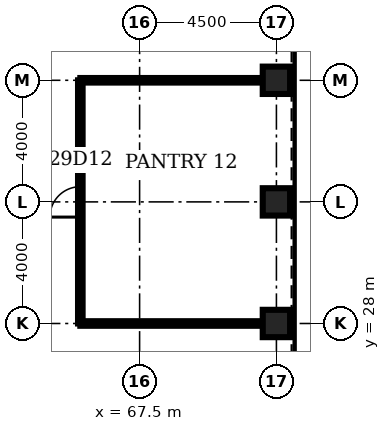
"""IFC4 building model, lengths in metres.
Left out: names, types, materials, properties, quantities, classifications, styles, units other than length and angle.
Written with IfcOpenShell. Run it as: python <this file> out.ifc"""

import sys

from ifc_helpers import new_model, si_unit, direction, frame, frame_2d, origin, origin_2d, place, context, subcontext, project, spatial, rectangle, hollow_rectangle, extrude, element, fill, save


model = new_model("IFC4")
c1 = context("Model", 3, precision=1e-05, world=origin(), true_north=direction((0.0, 1.0)))
c2 = subcontext(c1, "Body", "Model", "MODEL_VIEW")
j1 = project(units=[si_unit("LENGTHUNIT", "METRE"), si_unit("PLANEANGLEUNIT", "RADIAN")], contexts=[c1])
p1 = place(None, origin())
s1 = spatial("IfcSite", under=j1, at=p1, CompositionType="ELEMENT")
p2 = place(p1, origin())
s2 = spatial("IfcBuilding", under=s1, at=p2, CompositionType="ELEMENT")
p3 = place(p2, frame((0.0, 0.0, 134.1)))
s3 = spatial("IfcBuildingStorey", under=s2, at=p3, CompositionType="ELEMENT", Elevation=134.1)
for number, where, z_axis, x_axis in (
    (1, (72.0, 28.0, 0.0), (0.0, 0.0, 1.0), (1.0, 0.0, 0.0)),
    (2, (72.0, 32.0, 0.0), (0.0, 0.0, 1.0), (1.0, 0.0, 0.0)),
    (3, (72.0, 36.0, 0.0), (0.0, 0.0, 1.0), (1.0, 0.0, 0.0)),
):
    element("IfcColumn", number, at=place(p3, frame(where, z_axis=z_axis, x_axis=x_axis)), inside=s3, PredefinedType="COLUMN", context=c2, shape_type="SweptSolid", body=[
        extrude(hollow_rectangle(XDim=0.9, YDim=0.9, WallThickness=0.1, at=origin_2d()), origin(), (0.0, 0.0, 1.0), 4.2),
    ])
for number, where, z_axis, x_axis in (
    (4, (65.55, 28.0, 0.0), (0.0, 0.0, 1.0), (1.0, 0.0, 0.0)),
    (5, (65.55, 36.0, 0.0), (0.0, 0.0, 1.0), (1.0, 0.0, 0.0)),
):
    element("IfcWall", number, at=place(p3, frame(where, z_axis=z_axis, x_axis=x_axis)), inside=s3, PredefinedType="PARTITIONING", context=c2, shape_type="SweptSolid", body=[
        extrude(rectangle(XDim=6.0, YDim=0.15, at=frame_2d((3.0, 0.0))), origin(), (0.0, 0.0, 1.0), 3.0),
    ])
p4 = place(p3, frame((65.55, 28.0, 0.0), z_axis=(0.0, 0.0, 1.0), x_axis=(0.0, 1.0, 0.0)))
e6 = element("IfcWall", 6, at=p4, inside=s3, PredefinedType="PARTITIONING", context=c2, shape_type="SweptSolid", body=[
    extrude(rectangle(XDim=8.0, YDim=0.15, at=frame_2d((4.0, 0.0))), origin(), (0.0, 0.0, 1.0), 3.0),
])
p5 = place(p4, frame((3.5, 0.0, 0.0)))
e7 = element("IfcOpeningElement", 7, at=p5, cuts=e6, PredefinedType="OPENING", context=c2, shape_type="SweptSolid", body=[
    extrude(rectangle(XDim=1.0, YDim=2.1, at=frame_2d((0.5, 1.05))), frame((0.0, 0.085, 0.0), z_axis=(0.0, -1.0, 0.0), x_axis=(1.0, 0.0, 0.0)), (0.0, 0.0, 1.0), 0.17),
])
p6 = place(p5, origin())
e8 = element("IfcDoor", 8, at=p6, inside=s3, OperationType="SINGLE_SWING_LEFT", PredefinedType="DOOR", context=c2, shape_type="SweptSolid", body=[
    extrude(rectangle(XDim=1.0, YDim=2.1, at=frame_2d((0.5, 1.05))), frame((0.0, 0.025, 0.0), z_axis=(0.0, -1.0, 0.0), x_axis=(1.0, 0.0, 0.0)), (0.0, 0.0, 1.0), 0.05),
])
fill(e7, e8)
save(model, sys.argv[1])
